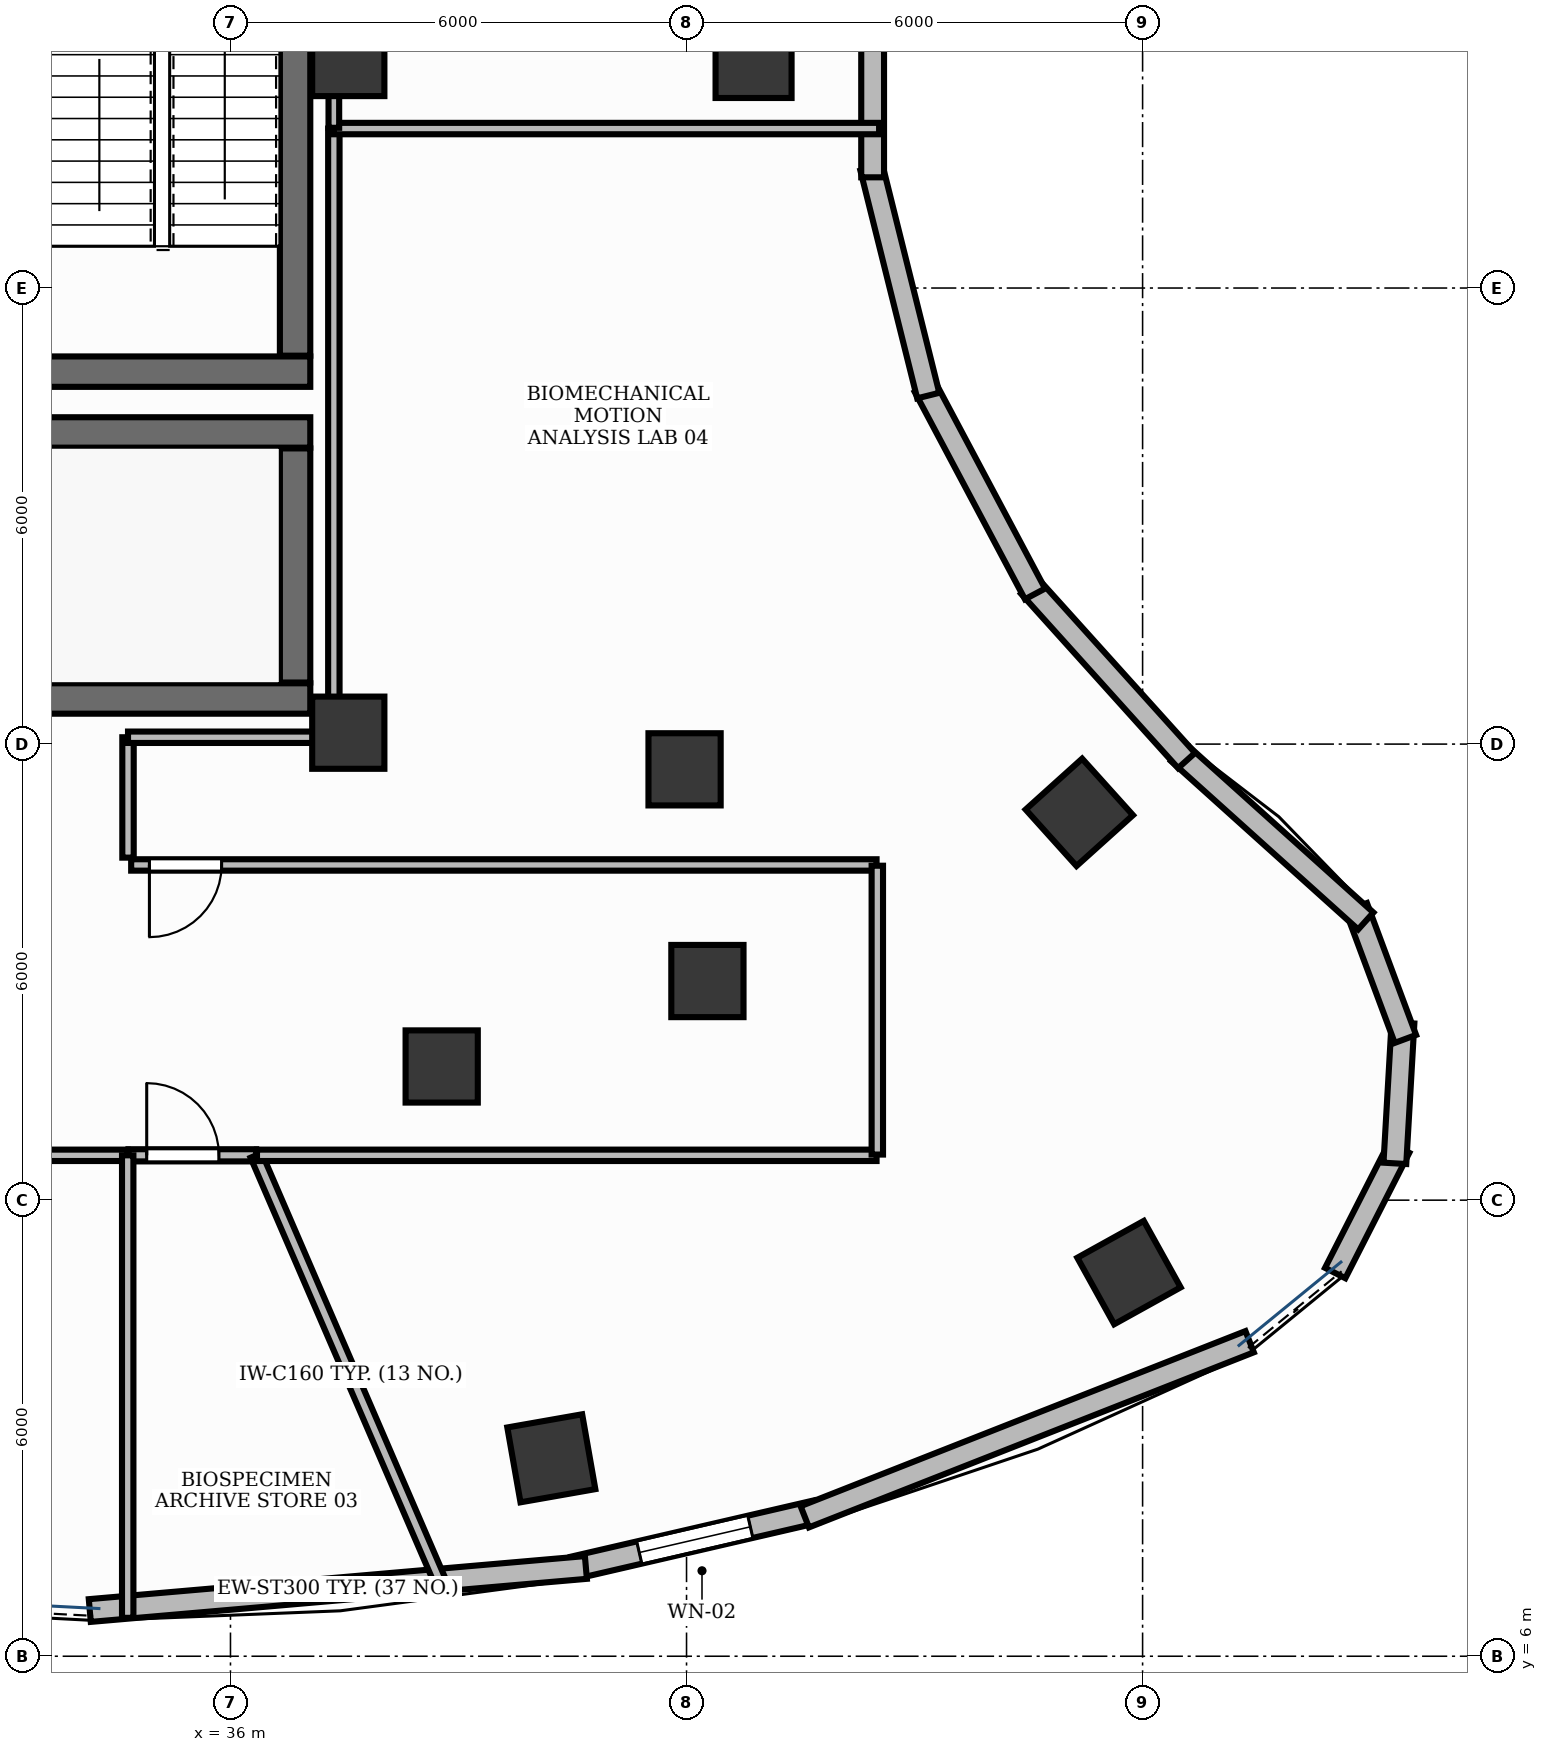
"""IFC4 building model, lengths in metres.
Left out: names, types, materials, properties, quantities, classifications, styles, units other than length and angle.
Written with IfcOpenShell. Run it as: python <this file> out.ifc"""

import sys

from ifc_helpers import new_model, si_unit, direction, frame, frame_2d, origin, origin_2d, place, context, subcontext, project, spatial, rectangle, extrude, element, fill, save


model = new_model("IFC4")
c1 = context("Model", 3, precision=1e-05, world=origin(), true_north=direction((0.0, 1.0)))
c2 = subcontext(c1, "Body", "Model", "MODEL_VIEW")
j1 = project(units=[si_unit("LENGTHUNIT", "METRE"), si_unit("PLANEANGLEUNIT", "RADIAN")], contexts=[c1])
p1 = place(None, origin())
s1 = spatial("IfcSite", under=j1, at=p1, CompositionType="ELEMENT")
p2 = place(p1, origin())
s2 = spatial("IfcBuilding", under=s1, at=p2, CompositionType="ELEMENT")
p3 = place(p2, frame((0.0, 0.0, 166.8)))
s3 = spatial("IfcBuildingStorey", under=s2, at=p3, CompositionType="ELEMENT", Elevation=166.8)
p4 = place(p3, frame((28.852, 18.6, 0.0), z_axis=(0.0, 0.0, 1.0), x_axis=(1.0, 0.0, 0.0)))
e1 = element("IfcWall", 1, at=p4, inside=s3, PredefinedType="SHEAR", context=c2, shape_type="SweptSolid", body=[
    extrude(rectangle(XDim=8.198, YDim=0.4, at=frame_2d((4.099, 0.0))), origin(), (0.0, 0.0, 1.0), 3.9),
])
p5 = place(p3, frame((28.4, 22.1, 0.0), z_axis=(0.0, 0.0, 1.0), x_axis=(1.0, 0.0, 0.0)))
e2 = element("IfcWall", 2, at=p5, inside=s3, PredefinedType="SHEAR", context=c2, shape_type="SweptSolid", body=[
    extrude(rectangle(XDim=8.65, YDim=0.4, at=frame_2d((4.325, 0.0))), origin(), (0.0, 0.0, 1.0), 3.9),
])
p6 = place(p3, frame((36.85, 18.81, 0.0), z_axis=(0.0, 0.0, 1.0), x_axis=(0.0, 1.0, 0.0)))
e3 = element("IfcWall", 3, at=p6, inside=s3, PredefinedType="SHEAR", context=c2, shape_type="SweptSolid", body=[
    extrude(rectangle(XDim=3.08, YDim=0.4, at=frame_2d((1.54, 0.0))), origin(), (0.0, 0.0, 1.0), 3.9),
])
p7 = place(p3, frame((33.15, 22.9, 0.0), z_axis=(0.0, 0.0, 1.0), x_axis=(1.0, 0.0, 0.0)))
e4 = element("IfcWall", 4, at=p7, inside=s3, PredefinedType="SHEAR", context=c2, shape_type="SweptSolid", body=[
    extrude(rectangle(XDim=3.9, YDim=0.4, at=frame_2d((1.95, 0.0))), origin(), (0.0, 0.0, 1.0), 3.9),
])
p8 = place(p3, frame((36.85, 23.11, 0.0), z_axis=(0.0, 0.0, 1.0), x_axis=(0.0, 1.0, 0.0)))
e5 = element("IfcWall", 5, at=p8, inside=s3, PredefinedType="SHEAR", context=c2, shape_type="SweptSolid", body=[
    extrude(rectangle(XDim=7.78, YDim=0.4, at=frame_2d((3.89, 0.0))), origin(), (0.0, 0.0, 1.0), 3.9),
])
for number, where, z_axis, x_axis in (
    (6, (37.55, 18.15, -0.0), (0.0, 0.0, 1.0), (1.0, 0.0, 0.0)),
    (7, (37.55, 27.0, -0.0), (0.0, 0.0, 1.0), (1.0, 0.0, 0.0)),
):
    element("IfcColumn", number, at=place(p3, frame(where, z_axis=z_axis, x_axis=x_axis)), inside=s3, PredefinedType="PILASTER", context=c2, shape_type="SweptSolid", body=[
        extrude(rectangle(XDim=0.95, YDim=0.95, at=origin_2d()), origin(), (0.0, 0.0, 1.0), 3.901),
    ])
p9 = place(p3, frame((40.221, 8.604, -0.0), z_axis=(0.0, 0.0, 1.0), x_axis=(0.984868307662, 0.173304404339, 0.0)))
e8 = element("IfcColumn", 8, at=p9, inside=s3, PredefinedType="COLUMN", context=c2, shape_type="SweptSolid", body=[
    extrude(rectangle(XDim=1.0, YDim=1.0, at=origin_2d()), origin(), (0.0, 0.0, 1.0), 3.901),
])
p10 = place(p3, frame((38.779, 13.759, -0.0), z_axis=(0.0, 0.0, 1.0), x_axis=(1.0, 0.0, 0.0)))
e9 = element("IfcColumn", 9, at=p10, inside=s3, PredefinedType="COLUMN", context=c2, shape_type="SweptSolid", body=[
    extrude(rectangle(XDim=0.95, YDim=0.95, at=origin_2d()), origin(), (0.0, 0.0, 1.0), 3.901),
])
p11 = place(p3, frame((47.821, 11.047, -0.0), z_axis=(0.0, 0.0, 1.0), x_axis=(0.874535078577, 0.484962262797, 0.0)))
e10 = element("IfcColumn", 10, at=p11, inside=s3, PredefinedType="COLUMN", context=c2, shape_type="SweptSolid", body=[
    extrude(rectangle(XDim=1.0, YDim=1.0, at=origin_2d()), origin(), (0.0, 0.0, 1.0), 3.901),
])
p12 = place(p3, frame((42.275, 14.883, -0.0), z_axis=(0.0, 0.0, 1.0), x_axis=(1.0, 0.0, 0.0)))
e11 = element("IfcColumn", 11, at=p12, inside=s3, PredefinedType="COLUMN", context=c2, shape_type="SweptSolid", body=[
    extrude(rectangle(XDim=0.95, YDim=0.95, at=origin_2d()), origin(), (0.0, 0.0, 1.0), 3.901),
])
p13 = place(p3, frame((47.167, 17.102, -0.0), z_axis=(0.0, 0.0, 1.0), x_axis=(-0.669130606359, 0.743144825477, 0.0)))
e12 = element("IfcColumn", 12, at=p13, inside=s3, PredefinedType="COLUMN", context=c2, shape_type="SweptSolid", body=[
    extrude(rectangle(XDim=1.0, YDim=1.0, at=origin_2d()), origin(), (0.0, 0.0, 1.0), 3.901),
])
p14 = place(p3, frame((41.974, 17.668, -0.0), z_axis=(0.0, 0.0, 1.0), x_axis=(1.0, 0.0, 0.0)))
e13 = element("IfcColumn", 13, at=p14, inside=s3, PredefinedType="COLUMN", context=c2, shape_type="SweptSolid", body=[
    extrude(rectangle(XDim=0.95, YDim=0.95, at=origin_2d()), origin(), (0.0, 0.0, 1.0), 3.901),
])
p15 = place(p3, frame((42.882, 27.0, -0.0), z_axis=(0.0, 0.0, 1.0), x_axis=(0.0, 1.0, 0.0)))
e14 = element("IfcColumn", 14, at=p15, inside=s3, PredefinedType="COLUMN", context=c2, shape_type="SweptSolid", body=[
    extrude(rectangle(XDim=1.0, YDim=1.0, at=origin_2d()), origin(), (0.0, 0.0, 1.0), 3.901),
])
p16 = place(p3, frame((40.514, 7.164, 0.0), z_axis=(0.0, 0.0, 1.0), x_axis=(0.974182179996, 0.225763327799, 0.0)))
e15 = element("IfcWall", 15, at=p16, inside=s3, PredefinedType="STANDARD", context=c2, shape_type="SweptSolid", body=[
    extrude(rectangle(XDim=3.274, YDim=0.3, at=frame_2d((1.637, 0.0))), origin(), (0.0, 0.0, 1.0), 3.9),
])
p17 = place(p16, frame((0.887, 0.0, 0.95)))
e16 = element("IfcOpeningElement", 16, at=p17, cuts=e15, PredefinedType="OPENING", context=c2, shape_type="SweptSolid", body=[
    extrude(rectangle(XDim=1.5, YDim=1.8, at=frame_2d((0.75, 0.9))), frame((0.0, 0.165, 0.0), z_axis=(0.0, -1.0, 0.0), x_axis=(1.0, 0.0, 0.0)), (0.0, 0.0, 1.0), 0.33),
])
p18 = place(p3, frame((34.149, 6.601, 0.0), z_axis=(0.0, 0.0, 1.0), x_axis=(0.996255675021, 0.086455942472, 0.0)))
e17 = element("IfcWall", 17, at=p18, inside=s3, PredefinedType="STANDARD", context=c2, shape_type="SweptSolid", body=[
    extrude(rectangle(XDim=6.551, YDim=0.3, at=frame_2d((3.276, 0.0))), origin(), (0.0, 0.0, 1.0), 3.9),
])
p19 = place(p3, frame((43.556, 7.835, 0.0), z_axis=(0.0, 0.0, 1.0), x_axis=(0.930552726132, 0.366157922062, 0.0)))
e18 = element("IfcWall", 18, at=p19, inside=s3, PredefinedType="STANDARD", context=c2, shape_type="SweptSolid", body=[
    extrude(rectangle(XDim=6.29, YDim=0.3, at=frame_2d((3.145, 0.0))), origin(), (0.0, 0.0, 1.0), 3.9),
])
for number, where, z_axis, x_axis in (
    (19, (50.534, 11.041, 0.0), (0.0, 0.0, 1.0), (0.454, 0.891, 0.0)),
    (20, (51.319, 12.484, 0.0), (0.0, 0.0, 1.0), (0.057, 0.998, 0.0)),
    (21, (51.458, 14.121, 0.0), (0.0, 0.0, 1.0), (-0.349, 0.937, 0.0)),
):
    element("IfcWall", number, at=place(p3, frame(where, z_axis=z_axis, x_axis=x_axis)), inside=s3, PredefinedType="STANDARD", context=c2, shape_type="SweptSolid", body=[
        extrude(rectangle(XDim=1.852, YDim=0.3, at=frame_2d((0.926, 0.0))), origin(), (0.0, 0.0, 1.0), 3.9),
    ])
p20 = place(p3, frame((50.936, 15.673, 0.0), z_axis=(0.0, 0.0, 1.0), x_axis=(-0.743341827472, 0.668911748687, 0.0)))
e22 = element("IfcWall", 22, at=p20, inside=s3, PredefinedType="STANDARD", context=c2, shape_type="SweptSolid", body=[
    extrude(rectangle(XDim=3.31, YDim=0.3, at=frame_2d((1.655, 0.0))), origin(), (0.0, 0.0, 1.0), 3.9),
])
for number, where, z_axis, x_axis in (
    (23, (48.579, 17.784, 0.0), (0.0, 0.0, 1.0), (-0.669, 0.743, 0.0)),
    (24, (46.584, 19.976, 0.0), (0.0, 0.0, 1.0), (-0.469, 0.883, 0.0)),
    (25, (45.18, 22.585, 0.0), (0.0, 0.0, 1.0), (-0.242, 0.97, 0.0)),
    (26, (44.448, 25.457, 0.0), (0.0, 0.0, 1.0), (0.0, 1.0, 0.0)),
):
    element("IfcWall", number, at=place(p3, frame(where, z_axis=z_axis, x_axis=x_axis)), inside=s3, PredefinedType="STANDARD", context=c2, shape_type="SweptSolid", body=[
        extrude(rectangle(XDim=3.087, YDim=0.3, at=frame_2d((1.543, 0.0))), origin(), (0.0, 0.0, 1.0), 3.9),
    ])
p21 = place(p3, frame((19.85, 12.59, 0.0), z_axis=(0.0, 0.0, 1.0), x_axis=(1.0, 0.0, 0.0)))
e27 = element("IfcWall", 27, at=p21, inside=s3, PredefinedType="PARTITIONING", context=c2, shape_type="SweptSolid", body=[
    extrude(rectangle(XDim=14.798, YDim=0.15, at=frame_2d((7.399, 0.0))), origin(), (0.0, 0.0, 1.0), 2.91),
])
p22 = place(p21, frame((4.809, 0.0, 0.0)))
e28 = element("IfcOpeningElement", 28, at=p22, cuts=e27, PredefinedType="OPENING", context=c2, shape_type="SweptSolid", body=[
    extrude(rectangle(XDim=0.95, YDim=2.15, at=frame_2d((0.475, 1.075))), frame((0.0, 0.09, 0.0), z_axis=(0.0, -1.0, 0.0), x_axis=(1.0, 0.0, 0.0)), (0.0, 0.0, 1.0), 0.18),
])
p23 = place(p3, frame((34.658, 12.59, 0.0), z_axis=(0.0, 0.0, 1.0), x_axis=(1.0, 0.0, 0.0)))
e29 = element("IfcWall", 29, at=p23, inside=s3, PredefinedType="PARTITIONING", context=c2, shape_type="SweptSolid", body=[
    extrude(rectangle(XDim=1.68, YDim=0.16, at=frame_2d((0.84, 0.0))), origin(), (0.0, 0.0, 1.0), 2.91),
])
p24 = place(p23, frame((0.24, 0.0, 0.0)))
e30 = element("IfcOpeningElement", 30, at=p24, cuts=e29, PredefinedType="OPENING", context=c2, shape_type="SweptSolid", body=[
    extrude(rectangle(XDim=0.95, YDim=2.15, at=frame_2d((0.475, 1.075))), frame((0.0, 0.095, 0.0), z_axis=(0.0, -1.0, 0.0), x_axis=(1.0, 0.0, 0.0)), (0.0, 0.0, 1.0), 0.19),
])
p25 = place(p3, frame((44.5, 16.41, 0.0), z_axis=(0.0, 0.0, 1.0), x_axis=(-1.0, 0.0, 0.0)))
e31 = element("IfcWall", 31, at=p25, inside=s3, PredefinedType="PARTITIONING", context=c2, shape_type="SweptSolid", body=[
    extrude(rectangle(XDim=9.806, YDim=0.15, at=frame_2d((4.903, 0.0))), origin(), (0.0, 0.0, 1.0), 2.91),
])
p26 = place(p25, frame((8.616, 0.0, 0.0)))
e32 = element("IfcOpeningElement", 32, at=p26, cuts=e31, PredefinedType="OPENING", context=c2, shape_type="SweptSolid", body=[
    extrude(rectangle(XDim=0.95, YDim=2.15, at=frame_2d((0.475, 1.075))), frame((0.0, 0.09, 0.0), z_axis=(0.0, -1.0, 0.0), x_axis=(1.0, 0.0, 0.0)), (0.0, 0.0, 1.0), 0.18),
])
p27 = place(p3, frame((34.648, 12.59, 0.0), z_axis=(0.0, 0.0, 1.0), x_axis=(0.0, -1.0, 0.0)))
e33 = element("IfcWall", 33, at=p27, inside=s3, PredefinedType="PARTITIONING", context=c2, shape_type="SweptSolid", body=[
    extrude(rectangle(XDim=6.085, YDim=0.15, at=frame_2d((3.042, 0.0))), origin(), (0.0, 0.0, 1.0), 2.91),
])
p28 = place(p3, frame((36.338, 12.59, 0.0), z_axis=(0.0, 0.0, 1.0), x_axis=(0.396278424629, -0.918130388438, 0.0)))
e34 = element("IfcWall", 34, at=p28, inside=s3, PredefinedType="PARTITIONING", context=c2, shape_type="SweptSolid", body=[
    extrude(rectangle(XDim=6.292, YDim=0.16, at=frame_2d((3.146, 0.0))), origin(), (0.0, 0.0, 1.0), 2.91),
])
p29 = place(p3, frame((36.349, 12.59, 0.0), z_axis=(0.0, 0.0, 1.0), x_axis=(1.0, 0.0, 0.0)))
e35 = element("IfcWall", 35, at=p29, inside=s3, PredefinedType="PARTITIONING", context=c2, shape_type="SweptSolid", body=[
    extrude(rectangle(XDim=8.151, YDim=0.15, at=frame_2d((4.076, 0.0))), origin(), (0.0, 0.0, 1.0), 2.91),
])
p30 = place(p3, frame((44.51, 12.6, 0.0), z_axis=(0.0, 0.0, 1.0), x_axis=(0.0, 1.0, 0.0)))
e36 = element("IfcWall", 36, at=p30, inside=s3, PredefinedType="PARTITIONING", context=c2, shape_type="SweptSolid", body=[
    extrude(rectangle(XDim=3.8, YDim=0.15, at=frame_2d((1.9, 0.0))), origin(), (0.0, 0.0, 1.0), 2.91),
])
p31 = place(p3, frame((34.652, 16.506, 0.0), z_axis=(0.0, 0.0, 1.0), x_axis=(0.0, 1.0, 0.0)))
e37 = element("IfcWall", 37, at=p31, inside=s3, PredefinedType="PARTITIONING", context=c2, shape_type="SweptSolid", body=[
    extrude(rectangle(XDim=1.584, YDim=0.15, at=frame_2d((0.792, 0.0))), origin(), (0.0, 0.0, 1.0), 2.91),
])
p32 = place(p3, frame((34.652, 18.09, 0.0), z_axis=(0.0, 0.0, 1.0), x_axis=(1.0, 0.0, 0.0)))
e38 = element("IfcWall", 38, at=p32, inside=s3, PredefinedType="PARTITIONING", context=c2, shape_type="SweptSolid", body=[
    extrude(rectangle(XDim=2.698, YDim=0.15, at=frame_2d((1.349, 0.0))), origin(), (0.0, 0.0, 1.0), 2.91),
])
p33 = place(p3, frame((37.36, 18.1, 0.0), z_axis=(0.0, 0.0, 1.0), x_axis=(0.0, 1.0, 0.0)))
e39 = element("IfcWall", 39, at=p33, inside=s3, PredefinedType="PARTITIONING", context=c2, shape_type="SweptSolid", body=[
    extrude(rectangle(XDim=7.998, YDim=0.15, at=frame_2d((3.999, 0.0))), origin(), (0.0, 0.0, 1.0), 2.91),
])
p34 = place(p3, frame((37.36, 26.098, 0.0), z_axis=(0.0, 0.0, 1.0), x_axis=(1.0, 0.0, 0.0)))
e40 = element("IfcWall", 40, at=p34, inside=s3, PredefinedType="PARTITIONING", context=c2, shape_type="SweptSolid", body=[
    extrude(rectangle(XDim=7.173, YDim=0.15, at=frame_2d((3.587, 0.0))), origin(), (0.0, 0.0, 1.0), 2.91),
])
p35 = place(p3, frame((37.36, 26.108, 0.0), z_axis=(0.0, 0.0, 1.0), x_axis=(0.0, 1.0, 0.0)))
e41 = element("IfcWall", 41, at=p35, inside=s3, PredefinedType="PARTITIONING", context=c2, shape_type="SweptSolid", body=[
    extrude(rectangle(XDim=9.792, YDim=0.14, at=frame_2d((4.896, 0.0))), origin(), (0.0, 0.0, 1.0), 2.91),
])
p36 = place(p17, origin())
e42 = element("IfcWindow", 42, at=p36, inside=s3, PartitioningType="DOUBLE_PANEL_VERTICAL", PredefinedType="WINDOW", context=c2, shape_type="SweptSolid", body=[
    extrude(rectangle(XDim=1.5, YDim=1.8, at=frame_2d((0.75, 0.9))), frame((0.0, 0.03, 0.0), z_axis=(0.0, -1.0, 0.0), x_axis=(1.0, 0.0, 0.0)), (0.0, 0.0, 1.0), 0.06),
])
fill(e16, e42)
p37 = place(p24, origin())
e43 = element("IfcDoor", 43, at=p37, inside=s3, OperationType="SINGLE_SWING_LEFT", PredefinedType="DOOR", context=c2, shape_type="SweptSolid", body=[
    extrude(rectangle(XDim=0.95, YDim=2.15, at=frame_2d((0.475, 1.075))), frame((0.0, 0.025, 0.0), z_axis=(0.0, -1.0, 0.0), x_axis=(1.0, 0.0, 0.0)), (0.0, 0.0, 1.0), 0.05),
])
fill(e30, e43)
p38 = place(p26, origin())
e44 = element("IfcDoor", 44, at=p38, inside=s3, OperationType="SINGLE_SWING_RIGHT", PredefinedType="DOOR", context=c2, shape_type="SweptSolid", body=[
    extrude(rectangle(XDim=0.95, YDim=2.15, at=frame_2d((0.475, 1.075))), frame((0.0, 0.025, 0.0), z_axis=(0.0, -1.0, 0.0), x_axis=(1.0, 0.0, 0.0)), (0.0, 0.0, 1.0), 0.05),
])
fill(e32, e44)
save(model, sys.argv[1])
